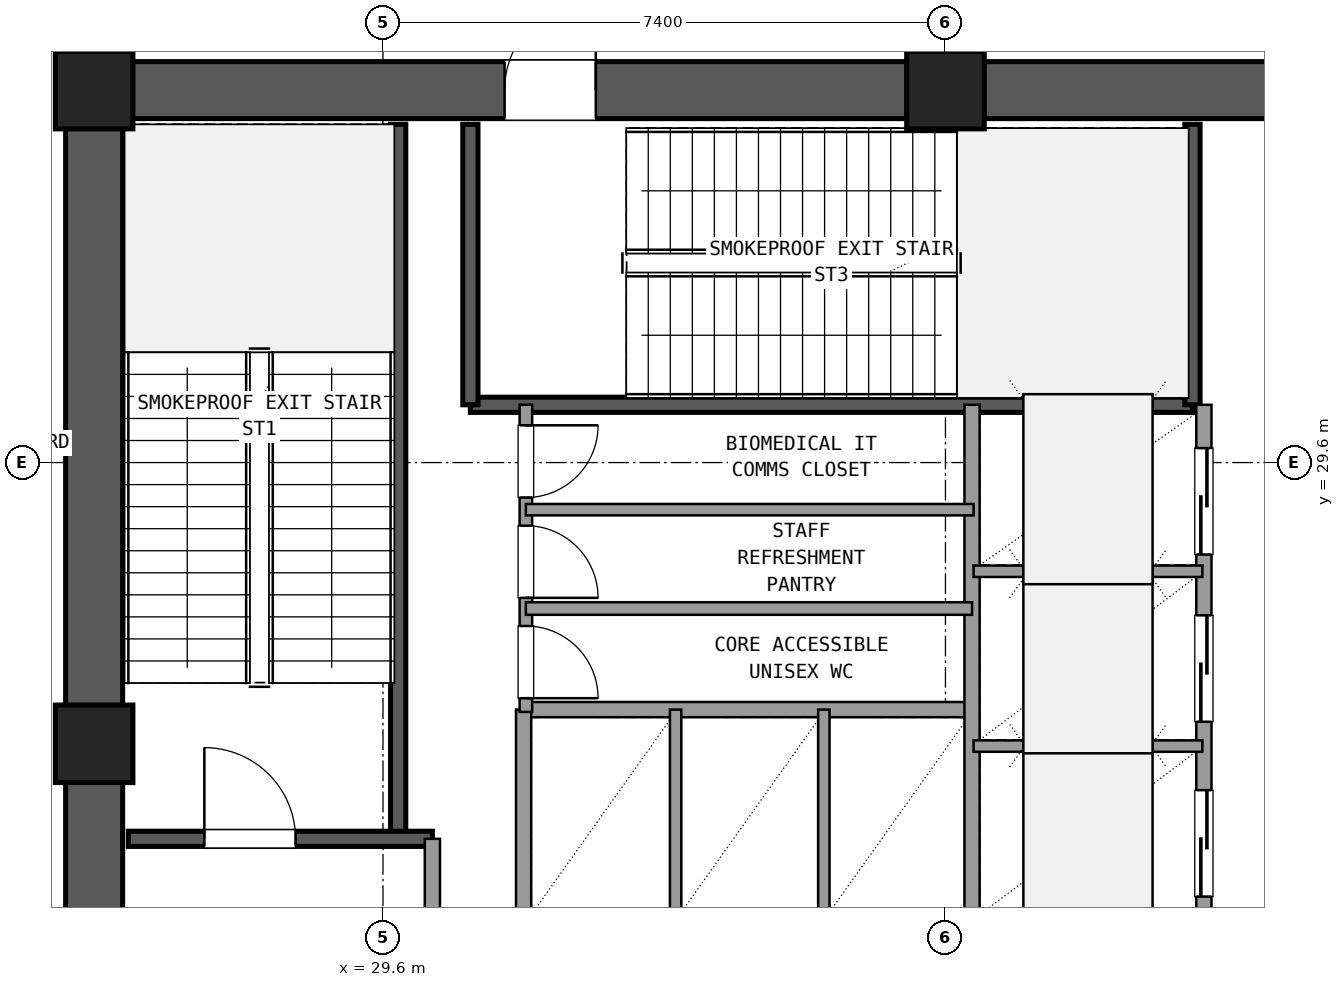
"""IFC4 building model, lengths in metres.
Left out: names, types, materials, properties, quantities, classifications, styles, units other than length and angle.
Written with IfcOpenShell. Run it as: python <this file> out.ifc"""

import sys

from ifc_helpers import new_model, si_unit, direction, frame, frame_2d, origin, origin_2d, place, context, subcontext, project, spatial, rectangle, extrude, element, fill, save


model = new_model("IFC4")
c1 = context("Model", 3, precision=1e-05, world=origin(), true_north=direction((0.0, 1.0)))
c2 = subcontext(c1, "Body", "Model", "MODEL_VIEW")
j1 = project(units=[si_unit("LENGTHUNIT", "METRE"), si_unit("PLANEANGLEUNIT", "RADIAN")], contexts=[c1])
p1 = place(None, origin())
s1 = spatial("IfcSite", under=j1, at=p1, CompositionType="ELEMENT")
p2 = place(p1, origin())
s2 = spatial("IfcBuilding", under=s1, at=p2, CompositionType="ELEMENT")
p3 = place(p2, frame((0.0, 0.0, 75.42)))
s3 = spatial("IfcBuildingStorey", under=s2, at=p3, CompositionType="ELEMENT", Elevation=75.42)
for number, where, z_axis, x_axis in (
    (1, (37.0, 34.5, 0.0), (0.0, 0.0, 1.0), (1.0, 0.0, 0.0)),
    (2, (25.8, 34.5, 0.0), (0.0, 0.0, 1.0), (1.0, 0.0, 0.0)),
    (3, (25.8, 25.9, 0.0), (0.0, 0.0, 1.0), (1.0, 0.0, 0.0)),
):
    element("IfcColumn", number, at=place(p3, frame(where, z_axis=z_axis, x_axis=x_axis)), inside=s3, PredefinedType="COLUMN", context=c2, shape_type="SweptSolid", body=[
        extrude(rectangle(XDim=1.02, YDim=1.02, at=origin_2d()), origin(), (0.0, 0.0, 1.0), 5.76),
    ])
p4 = place(p3, frame((47.695, 34.5, 0.0), z_axis=(0.0, 0.0, 1.0), x_axis=(-1.0, 0.0, 0.0)))
e4 = element("IfcWall", 4, at=p4, inside=s3, PredefinedType="SHEAR", context=c2, shape_type="SweptSolid", body=[
    extrude(rectangle(XDim=10.19, YDim=0.75, at=frame_2d((5.095, 0.0))), origin(), (0.0, 0.0, 1.0), 5.48),
])
p5 = place(p4, frame((4.595, 0.0, 0.0)))
e5 = element("IfcOpeningElement", 5, at=p5, cuts=e4, PredefinedType="OPENING", context=c2, shape_type="SweptSolid", body=[
    extrude(rectangle(XDim=1.6, YDim=2.2, at=frame_2d((0.8, 1.1))), frame((0.0, 0.385, 0.0), z_axis=(0.0, -1.0, 0.0), x_axis=(1.0, 0.0, 0.0)), (0.0, 0.0, 1.0), 0.77),
])
p6 = place(p3, frame((36.495, 34.5, 0.0), z_axis=(0.0, 0.0, 1.0), x_axis=(-1.0, 0.0, 0.0)))
e6 = element("IfcWall", 6, at=p6, inside=s3, PredefinedType="SHEAR", context=c2, shape_type="SweptSolid", body=[
    extrude(rectangle(XDim=10.19, YDim=0.75, at=frame_2d((5.095, 0.0))), origin(), (0.0, 0.0, 1.0), 5.48),
])
p7 = place(p6, frame((4.095, 0.0, 0.0)))
e7 = element("IfcOpeningElement", 7, at=p7, cuts=e6, PredefinedType="OPENING", context=c2, shape_type="SweptSolid", body=[
    extrude(rectangle(XDim=1.2, YDim=2.15, at=frame_2d((0.6, 1.075))), frame((0.0, 0.385, 0.0), z_axis=(0.0, -1.0, 0.0), x_axis=(1.0, 0.0, 0.0)), (0.0, 0.0, 1.0), 0.77),
])
p8 = place(p3, frame((25.8, 33.995, 0.0), z_axis=(0.0, 0.0, 1.0), x_axis=(0.0, -1.0, 0.0)))
e8 = element("IfcWall", 8, at=p8, inside=s3, PredefinedType="SHEAR", context=c2, shape_type="SweptSolid", body=[
    extrude(rectangle(XDim=7.59, YDim=0.75, at=frame_2d((3.795, 0.0))), origin(), (0.0, 0.0, 1.0), 5.48),
])
p9 = place(p3, frame((25.8, 25.395, 0.0), z_axis=(0.0, 0.0, 1.0), x_axis=(0.0, -1.0, 0.0)))
e9 = element("IfcWall", 9, at=p9, inside=s3, PredefinedType="SHEAR", context=c2, shape_type="SweptSolid", body=[
    extrude(rectangle(XDim=7.59, YDim=0.75, at=frame_2d((3.795, 0.0))), origin(), (0.0, 0.0, 1.0), 5.48),
])
p10 = place(p9, frame((2.145, 0.0, 0.0)))
e10 = element("IfcOpeningElement", 10, at=p10, cuts=e9, PredefinedType="OPENING", context=c2, shape_type="SweptSolid", body=[
    extrude(rectangle(XDim=1.2, YDim=2.15, at=frame_2d((0.6, 1.075))), frame((0.0, 0.385, 0.0), z_axis=(0.0, -1.0, 0.0), x_axis=(1.0, 0.0, 0.0)), (0.0, 0.0, 1.0), 0.77),
])
p11 = place(p3, frame((29.8, 24.65, 0.0), z_axis=(0.0, 0.0, 1.0), x_axis=(0.0, 1.0, 0.0)))
e11 = element("IfcWall", 11, at=p11, inside=s3, PredefinedType="SHEAR", context=c2, shape_type="SweptSolid", body=[
    extrude(rectangle(XDim=9.4, YDim=0.2, at=frame_2d((4.7, 0.0))), origin(), (0.0, 0.0, 1.0), 5.48),
])
p12 = place(p3, frame((26.25, 24.65, 0.0), z_axis=(0.0, 0.0, 1.0), x_axis=(1.0, 0.0, 0.0)))
e12 = element("IfcWall", 12, at=p12, inside=s3, PredefinedType="SHEAR", context=c2, shape_type="SweptSolid", body=[
    extrude(rectangle(XDim=4.0, YDim=0.2, at=frame_2d((2.0, 0.0))), origin(), (0.0, 0.0, 1.0), 5.48),
])
p13 = place(p12, frame((1.0, 0.0, 0.0)))
e13 = element("IfcOpeningElement", 13, at=p13, cuts=e12, PredefinedType="OPENING", context=c2, shape_type="SweptSolid", body=[
    extrude(rectangle(XDim=1.2, YDim=2.15, at=frame_2d((0.6, 1.075))), frame((0.0, 0.11, 0.0), z_axis=(0.0, -1.0, 0.0), x_axis=(1.0, 0.0, 0.0)), (0.0, 0.0, 1.0), 0.22),
])
p14 = place(p3, frame((30.75, 30.36, 0.0), z_axis=(0.0, 0.0, 1.0), x_axis=(1.0, 0.0, 0.0)))
e14 = element("IfcWall", 14, at=p14, inside=s3, PredefinedType="SHEAR", context=c2, shape_type="SweptSolid", body=[
    extrude(rectangle(XDim=9.5, YDim=0.2, at=frame_2d((4.75, 0.0))), origin(), (0.0, 0.0, 1.0), 5.48),
])
for number, where, z_axis, x_axis in (
    (15, (30.75, 30.36, 0.0), (0.0, 0.0, 1.0), (0.0, 1.0, 0.0)),
    (16, (40.25, 30.36, 0.0), (0.0, 0.0, 1.0), (0.0, 1.0, 0.0)),
):
    element("IfcWall", number, at=place(p3, frame(where, z_axis=z_axis, x_axis=x_axis)), inside=s3, PredefinedType="SHEAR", context=c2, shape_type="SweptSolid", body=[
        extrude(rectangle(XDim=3.69, YDim=0.2, at=frame_2d((1.845, 0.0))), origin(), (0.0, 0.0, 1.0), 5.48),
    ])
p15 = place(p3, frame((30.25, 17.75, 0.0), z_axis=(0.0, 0.0, 1.0), x_axis=(0.0, 1.0, 0.0)))
e17 = element("IfcWall", 17, at=p15, inside=s3, PredefinedType="SOLIDWALL", context=c2, shape_type="SweptSolid", body=[
    extrude(rectangle(XDim=6.9, YDim=0.2, at=frame_2d((3.45, 0.0))), origin(), (0.0, 0.0, 1.0), 4.77),
])
p16 = place(p15, frame((4.15, 0.0, 0.0)))
e18 = element("IfcOpeningElement", 18, at=p16, cuts=e17, PredefinedType="OPENING", context=c2, shape_type="SweptSolid", body=[
    extrude(rectangle(XDim=1.2, YDim=2.15, at=frame_2d((0.6, 1.075))), frame((0.0, 0.11, 0.0), z_axis=(0.0, -1.0, 0.0), x_axis=(1.0, 0.0, 0.0)), (0.0, 0.0, 1.0), 0.22),
])
p17 = place(p3, frame((31.45, 26.35, 0.0), z_axis=(0.0, 0.0, 1.0), x_axis=(1.0, 0.0, 0.0)))
e19 = element("IfcWall", 19, at=p17, inside=s3, PredefinedType="SOLIDWALL", context=c2, shape_type="SweptSolid", body=[
    extrude(rectangle(XDim=5.9, YDim=0.2, at=frame_2d((2.95, 0.0))), origin(), (0.0, 0.0, 1.0), 4.77),
])
p18 = place(p3, frame((31.45, 23.54, 0.0), z_axis=(0.0, 0.0, 1.0), x_axis=(0.0, 1.0, 0.0)))
e20 = element("IfcWall", 20, at=p18, inside=s3, PredefinedType="SOLIDWALL", context=c2, shape_type="SweptSolid", body=[
    extrude(rectangle(XDim=2.81, YDim=0.2, at=frame_2d((1.405, 0.0))), origin(), (0.0, 0.0, 1.0), 4.77),
])
for number, where, z_axis, x_axis in (
    (21, (33.45, 23.54, 0.0), (0.0, 0.0, 1.0), (0.0, 1.0, 0.0)),
    (22, (35.4, 23.54, 0.0), (0.0, 0.0, 1.0), (0.0, 1.0, 0.0)),
):
    element("IfcWall", number, at=place(p3, frame(where, z_axis=z_axis, x_axis=x_axis)), inside=s3, PredefinedType="PARTITIONING", context=c2, shape_type="SweptSolid", body=[
        extrude(rectangle(XDim=2.81, YDim=0.15, at=frame_2d((1.405, 0.0))), origin(), (0.0, 0.0, 1.0), 4.77),
    ])
p19 = place(p3, frame((37.35, 23.54, 0.0), z_axis=(0.0, 0.0, 1.0), x_axis=(0.0, 1.0, 0.0)))
e23 = element("IfcWall", 23, at=p19, inside=s3, PredefinedType="SOLIDWALL", context=c2, shape_type="SweptSolid", body=[
    extrude(rectangle(XDim=6.82, YDim=0.2, at=frame_2d((3.41, 0.0))), origin(), (0.0, 0.0, 1.0), 4.77),
])
p20 = place(p3, frame((40.4, 23.54, 0.0), z_axis=(0.0, 0.0, 1.0), x_axis=(0.0, 1.0, 0.0)))
e24 = element("IfcWall", 24, at=p20, inside=s3, PredefinedType="SOLIDWALL", context=c2, shape_type="SweptSolid", body=[
    extrude(rectangle(XDim=6.82, YDim=0.2, at=frame_2d((3.41, 0.0))), origin(), (0.0, 0.0, 1.0), 4.77),
])
p21 = place(p20, frame((0.35, 0.0, 0.0)))
e25 = element("IfcOpeningElement", 25, at=p21, cuts=e24, PredefinedType="OPENING", context=c2, shape_type="SweptSolid", body=[
    extrude(rectangle(XDim=1.4, YDim=2.2, at=frame_2d((0.7, 1.1))), frame((0.0, 0.11, 0.0), z_axis=(0.0, -1.0, 0.0), x_axis=(1.0, 0.0, 0.0)), (0.0, 0.0, 1.0), 0.22),
])
p22 = place(p20, frame((2.65, 0.0, 0.0)))
e26 = element("IfcOpeningElement", 26, at=p22, cuts=e24, PredefinedType="OPENING", context=c2, shape_type="SweptSolid", body=[
    extrude(rectangle(XDim=1.4, YDim=2.2, at=frame_2d((0.7, 1.1))), frame((0.0, 0.11, 0.0), z_axis=(0.0, -1.0, 0.0), x_axis=(1.0, 0.0, 0.0)), (0.0, 0.0, 1.0), 0.22),
])
p23 = place(p20, frame((4.85, 0.0, 0.0)))
e27 = element("IfcOpeningElement", 27, at=p23, cuts=e24, PredefinedType="OPENING", context=c2, shape_type="SweptSolid", body=[
    extrude(rectangle(XDim=1.4, YDim=2.2, at=frame_2d((0.7, 1.1))), frame((0.0, 0.11, 0.0), z_axis=(0.0, -1.0, 0.0), x_axis=(1.0, 0.0, 0.0)), (0.0, 0.0, 1.0), 0.22),
])
for number, where, z_axis, x_axis in (
    (28, (37.37, 25.87, 0.0), (0.0, 0.0, 1.0), (1.0, 0.0, 0.0)),
    (29, (37.37, 28.17, 0.0), (0.0, 0.0, 1.0), (1.0, 0.0, 0.0)),
):
    element("IfcWall", number, at=place(p3, frame(where, z_axis=z_axis, x_axis=x_axis)), inside=s3, PredefinedType="PARTITIONING", context=c2, shape_type="SweptSolid", body=[
        extrude(rectangle(XDim=3.01, YDim=0.15, at=frame_2d((1.505, 0.0))), origin(), (0.0, 0.0, 1.0), 4.77),
    ])
p24 = place(p3, frame((31.48, 26.32, 0.0), z_axis=(0.0, 0.0, 1.0), x_axis=(0.0, 1.0, 0.0)))
e30 = element("IfcWall", 30, at=p24, inside=s3, PredefinedType="PLUMBINGWALL", context=c2, shape_type="SweptSolid", body=[
    extrude(rectangle(XDim=4.04, YDim=0.165, at=frame_2d((2.02, 0.0))), origin(), (0.0, 0.0, 1.0), 4.77),
])
p25 = place(p24, frame((0.18, 0.0, 0.0)))
e31 = element("IfcOpeningElement", 31, at=p25, cuts=e30, PredefinedType="OPENING", context=c2, shape_type="SweptSolid", body=[
    extrude(rectangle(XDim=0.95, YDim=2.1, at=frame_2d((0.475, 1.05))), frame((0.0, 0.093, 0.0), z_axis=(0.0, -1.0, 0.0), x_axis=(1.0, 0.0, 0.0)), (0.0, 0.0, 1.0), 0.185),
])
p26 = place(p24, frame((1.5, 0.0, 0.0)))
e32 = element("IfcOpeningElement", 32, at=p26, cuts=e30, PredefinedType="OPENING", context=c2, shape_type="SweptSolid", body=[
    extrude(rectangle(XDim=0.95, YDim=2.1, at=frame_2d((0.475, 1.05))), frame((0.0, 0.093, 0.0), z_axis=(0.0, -1.0, 0.0), x_axis=(1.0, 0.0, 0.0)), (0.0, 0.0, 1.0), 0.185),
])
p27 = place(p24, frame((2.82, 0.0, 0.0)))
e33 = element("IfcOpeningElement", 33, at=p27, cuts=e30, PredefinedType="OPENING", context=c2, shape_type="SweptSolid", body=[
    extrude(rectangle(XDim=0.95, YDim=2.1, at=frame_2d((0.475, 1.05))), frame((0.0, 0.093, 0.0), z_axis=(0.0, -1.0, 0.0), x_axis=(1.0, 0.0, 0.0)), (0.0, 0.0, 1.0), 0.185),
])
p28 = place(p3, frame((31.48, 27.68, 0.0), z_axis=(0.0, 0.0, 1.0), x_axis=(1.0, 0.0, 0.0)))
e34 = element("IfcWall", 34, at=p28, inside=s3, PredefinedType="PLUMBINGWALL", context=c2, shape_type="SweptSolid", body=[
    extrude(rectangle(XDim=5.87, YDim=0.165, at=frame_2d((2.935, 0.0))), origin(), (0.0, 0.0, 1.0), 4.77),
])
p29 = place(p3, frame((31.48, 28.98, 0.0), z_axis=(0.0, 0.0, 1.0), x_axis=(1.0, 0.0, 0.0)))
e35 = element("IfcWall", 35, at=p29, inside=s3, PredefinedType="PARTITIONING", context=c2, shape_type="SweptSolid", body=[
    extrude(rectangle(XDim=5.89, YDim=0.15, at=frame_2d((2.945, 0.0))), origin(), (0.0, 0.0, 1.0), 4.77),
])
p30 = place(p3, frame((37.0, 34.95, 0.0), z_axis=(0.0, 0.0, 1.0), x_axis=(0.0, 1.0, 0.0)))
e36 = element("IfcWall", 36, at=p30, inside=s3, PredefinedType="PARTITIONING", context=c2, shape_type="SweptSolid", body=[
    extrude(rectangle(XDim=2.56, YDim=0.18, at=frame_2d((1.28, 0.0))), origin(), (0.0, 0.0, 1.0), 4.77),
])
p31 = place(p30, frame((0.28, 0.0, 0.0)))
e37 = element("IfcOpeningElement", 37, at=p31, cuts=e36, PredefinedType="OPENING", context=c2, shape_type="SweptSolid", body=[
    extrude(rectangle(XDim=2.0, YDim=2.2, at=frame_2d((1.0, 1.1))), frame((0.0, 0.1, 0.0), z_axis=(0.0, -1.0, 0.0), x_axis=(1.0, 0.0, 0.0)), (0.0, 0.0, 1.0), 0.2),
])
p32 = place(p13, origin())
e38 = element("IfcDoor", 38, at=p32, inside=s3, OperationType="SINGLE_SWING_LEFT", PredefinedType="DOOR", context=c2, shape_type="SweptSolid", body=[
    extrude(rectangle(XDim=1.2, YDim=2.15, at=frame_2d((0.6, 1.075))), frame((0.0, 0.025, 0.0), z_axis=(0.0, -1.0, 0.0), x_axis=(1.0, 0.0, 0.0)), (0.0, 0.0, 1.0), 0.05),
])
fill(e13, e38)
p33 = place(p7, frame((1.2, 0.0, 0.0), z_axis=(0.0, 0.0, 1.0), x_axis=(-1.0, 0.0, 0.0)))
e39 = element("IfcDoor", 39, at=p33, inside=s3, OperationType="SINGLE_SWING_LEFT", PredefinedType="DOOR", context=c2, shape_type="SweptSolid", body=[
    extrude(rectangle(XDim=1.2, YDim=2.15, at=frame_2d((0.6, 1.075))), frame((0.0, 0.025, 0.0), z_axis=(0.0, -1.0, 0.0), x_axis=(1.0, 0.0, 0.0)), (0.0, 0.0, 1.0), 0.05),
])
fill(e7, e39)
p34 = place(p21, origin())
e40 = element("IfcDoor", 40, at=p34, inside=s3, OperationType="SLIDING_TO_LEFT", PredefinedType="DOOR", context=c2, shape_type="SweptSolid", body=[
    extrude(rectangle(XDim=1.4, YDim=2.2, at=frame_2d((0.7, 1.1))), frame((0.0, 0.025, 0.0), z_axis=(0.0, -1.0, 0.0), x_axis=(1.0, 0.0, 0.0)), (0.0, 0.0, 1.0), 0.05),
])
fill(e25, e40)
p35 = place(p22, origin())
e41 = element("IfcDoor", 41, at=p35, inside=s3, OperationType="SLIDING_TO_LEFT", PredefinedType="DOOR", context=c2, shape_type="SweptSolid", body=[
    extrude(rectangle(XDim=1.4, YDim=2.2, at=frame_2d((0.7, 1.1))), frame((0.0, 0.025, 0.0), z_axis=(0.0, -1.0, 0.0), x_axis=(1.0, 0.0, 0.0)), (0.0, 0.0, 1.0), 0.05),
])
fill(e26, e41)
p36 = place(p23, origin())
e42 = element("IfcDoor", 42, at=p36, inside=s3, OperationType="SLIDING_TO_RIGHT", PredefinedType="DOOR", context=c2, shape_type="SweptSolid", body=[
    extrude(rectangle(XDim=1.4, YDim=2.2, at=frame_2d((0.7, 1.1))), frame((0.0, 0.025, 0.0), z_axis=(0.0, -1.0, 0.0), x_axis=(1.0, 0.0, 0.0)), (0.0, 0.0, 1.0), 0.05),
])
fill(e27, e42)
p37 = place(p25, frame((0.95, 0.0, 0.0), z_axis=(0.0, 0.0, 1.0), x_axis=(-1.0, 0.0, 0.0)))
e43 = element("IfcDoor", 43, at=p37, inside=s3, OperationType="SINGLE_SWING_LEFT", PredefinedType="DOOR", context=c2, shape_type="SweptSolid", body=[
    extrude(rectangle(XDim=0.95, YDim=2.1, at=frame_2d((0.475, 1.05))), frame((0.0, 0.025, 0.0), z_axis=(0.0, -1.0, 0.0), x_axis=(1.0, 0.0, 0.0)), (0.0, 0.0, 1.0), 0.05),
])
fill(e31, e43)
p38 = place(p26, frame((0.95, 0.0, 0.0), z_axis=(0.0, 0.0, 1.0), x_axis=(-1.0, 0.0, 0.0)))
e44 = element("IfcDoor", 44, at=p38, inside=s3, OperationType="SINGLE_SWING_LEFT", PredefinedType="DOOR", context=c2, shape_type="SweptSolid", body=[
    extrude(rectangle(XDim=0.95, YDim=2.1, at=frame_2d((0.475, 1.05))), frame((0.0, 0.025, 0.0), z_axis=(0.0, -1.0, 0.0), x_axis=(1.0, 0.0, 0.0)), (0.0, 0.0, 1.0), 0.05),
])
fill(e32, e44)
p39 = place(p27, frame((0.95, 0.0, 0.0), z_axis=(0.0, 0.0, 1.0), x_axis=(-1.0, 0.0, 0.0)))
e45 = element("IfcDoor", 45, at=p39, inside=s3, OperationType="SINGLE_SWING_RIGHT", PredefinedType="DOOR", context=c2, shape_type="SweptSolid", body=[
    extrude(rectangle(XDim=0.95, YDim=2.1, at=frame_2d((0.475, 1.05))), frame((0.0, 0.025, 0.0), z_axis=(0.0, -1.0, 0.0), x_axis=(1.0, 0.0, 0.0)), (0.0, 0.0, 1.0), 0.05),
])
fill(e33, e45)
save(model, sys.argv[1])
